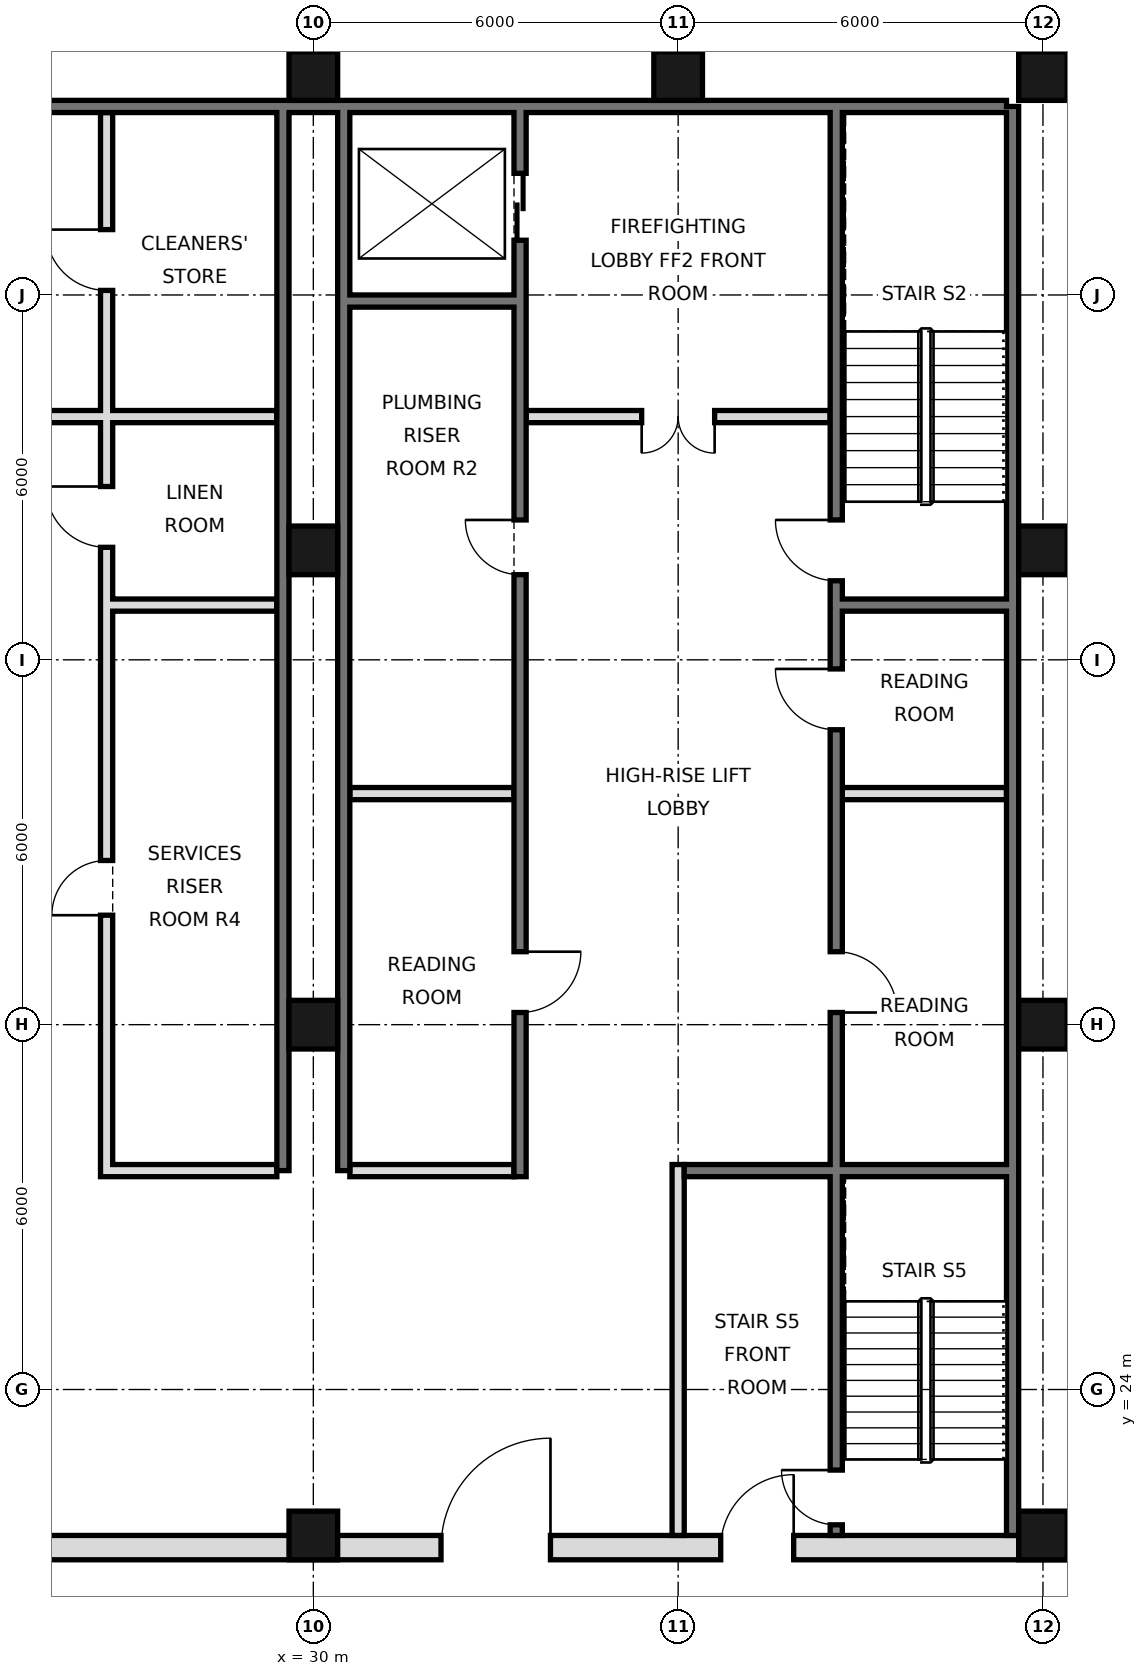
"""IFC4 building model, lengths in metres.
Left out: names, types, materials, properties, quantities, classifications, styles, units other than length and angle.
Written with IfcOpenShell. Run it as: python <this file> out.ifc"""

import sys

from ifc_helpers import new_model, si_unit, direction, frame, frame_2d, origin, origin_2d, place, context, subcontext, project, spatial, rectangle, hollow_rectangle, extrude, element, fill, save


model = new_model("IFC4")
c1 = context("Model", 3, precision=1e-05, world=origin(), true_north=direction((0.0, 1.0)))
c2 = subcontext(c1, "Body", "Model", "MODEL_VIEW")
j1 = project(units=[si_unit("LENGTHUNIT", "METRE"), si_unit("PLANEANGLEUNIT", "RADIAN")], contexts=[c1])
p1 = place(None, origin())
s1 = spatial("IfcSite", under=j1, at=p1, CompositionType="ELEMENT")
p2 = place(p1, origin())
s2 = spatial("IfcBuilding", under=s1, at=p2, CompositionType="ELEMENT")
p3 = place(p2, frame((0.0, 0.0, 75.0)))
s3 = spatial("IfcBuildingStorey", under=s2, at=p3, CompositionType="ELEMENT", Elevation=75.0)
for number, where, z_axis, x_axis in (
    (1, (30.0, 21.6, 0.0), (0.0, 0.0, 1.0), (1.0, 0.0, 0.0)),
    (2, (30.0, 30.0, 0.0), (0.0, 0.0, 1.0), (1.0, 0.0, 0.0)),
    (3, (30.0, 37.8, 0.0), (0.0, 0.0, 1.0), (1.0, 0.0, 0.0)),
    (4, (30.0, 45.6, 0.0), (0.0, 0.0, 1.0), (1.0, 0.0, 0.0)),
    (5, (36.0, 45.6, 0.0), (0.0, 0.0, 1.0), (1.0, 0.0, 0.0)),
    (6, (42.0, 21.6, 0.0), (0.0, 0.0, 1.0), (1.0, 0.0, 0.0)),
    (7, (42.0, 30.0, 0.0), (0.0, 0.0, 1.0), (1.0, 0.0, 0.0)),
    (8, (42.0, 37.8, 0.0), (0.0, 0.0, 1.0), (1.0, 0.0, 0.0)),
    (9, (42.0, 45.6, 0.0), (0.0, 0.0, 1.0), (1.0, 0.0, 0.0)),
):
    element("IfcColumn", number, at=place(p3, frame(where, z_axis=z_axis, x_axis=x_axis)), inside=s3, PredefinedType="COLUMN", context=c2, shape_type="SweptSolid", body=[
        extrude(hollow_rectangle(XDim=0.8, YDim=0.8, WallThickness=0.06, at=origin_2d()), origin(), (0.0, 0.0, 1.0), 3.6),
    ])
p4 = place(p3, frame((41.5, 21.6, 0.0), z_axis=(0.0, 0.0, 1.0), x_axis=(0.0, 1.0, 0.0)))
e10 = element("IfcWall", 10, at=p4, inside=s3, PredefinedType="SOLIDWALL", context=c2, shape_type="SweptSolid", body=[
    extrude(rectangle(XDim=23.5, YDim=0.2, at=frame_2d((11.75, 0.0))), origin(), (0.0, 0.0, 1.0), 3.42),
])
p5 = place(p3, frame((6.6, 45.1, 0.0), z_axis=(0.0, 0.0, 1.0), x_axis=(1.0, 0.0, 0.0)))
e11 = element("IfcWall", 11, at=p5, inside=s3, PredefinedType="SOLIDWALL", context=c2, shape_type="SweptSolid", body=[
    extrude(rectangle(XDim=34.8, YDim=0.2, at=frame_2d((17.4, 0.0))), origin(), (0.0, 0.0, 1.0), 3.42),
])
for number, where, z_axis, x_axis in (
    (12, (29.5, 27.6, 0.0), (0.0, 0.0, 1.0), (0.0, 1.0, 0.0)),
    (13, (30.5, 27.6, 0.0), (0.0, 0.0, 1.0), (0.0, 1.0, 0.0)),
):
    element("IfcWall", number, at=place(p3, frame(where, z_axis=z_axis, x_axis=x_axis)), inside=s3, PredefinedType="SOLIDWALL", context=c2, shape_type="SweptSolid", body=[
        extrude(rectangle(XDim=17.5, YDim=0.2, at=frame_2d((8.75, 0.0))), origin(), (0.0, 0.0, 1.0), 3.42),
    ])
p6 = place(p3, frame((5.6, 21.4, 0.0), z_axis=(0.0, 0.0, 1.0), x_axis=(1.0, 0.0, 0.0)))
e14 = element("IfcWall", 14, at=p6, inside=s3, PredefinedType="SOLIDWALL", context=c2, shape_type="SweptSolid", body=[
    extrude(rectangle(XDim=36.8, YDim=0.4, at=frame_2d((18.4, 0.0))), origin(), (0.0, 0.0, 1.0), 3.42),
])
p7 = place(p6, frame((8.5, 0.0, 0.0)))
e15 = element("IfcOpeningElement", 15, at=p7, cuts=e14, PredefinedType="OPENING", context=c2, shape_type="SweptSolid", body=[
    extrude(rectangle(XDim=1.8, YDim=2.1, at=frame_2d((0.9, 1.05))), frame((0.0, 0.21, 0.0), z_axis=(0.0, -1.0, 0.0), x_axis=(1.0, 0.0, 0.0)), (0.0, 0.0, 1.0), 0.42),
])
p8 = place(p6, frame((17.5, 0.0, 0.0)))
e16 = element("IfcOpeningElement", 16, at=p8, cuts=e14, PredefinedType="OPENING", context=c2, shape_type="SweptSolid", body=[
    extrude(rectangle(XDim=1.8, YDim=2.1, at=frame_2d((0.9, 1.05))), frame((0.0, 0.21, 0.0), z_axis=(0.0, -1.0, 0.0), x_axis=(1.0, 0.0, 0.0)), (0.0, 0.0, 1.0), 0.42),
])
p9 = place(p6, frame((26.5, 0.0, 0.0)))
e17 = element("IfcOpeningElement", 17, at=p9, cuts=e14, PredefinedType="OPENING", context=c2, shape_type="SweptSolid", body=[
    extrude(rectangle(XDim=1.8, YDim=2.1, at=frame_2d((0.9, 1.05))), frame((0.0, 0.21, 0.0), z_axis=(0.0, -1.0, 0.0), x_axis=(1.0, 0.0, 0.0)), (0.0, 0.0, 1.0), 0.42),
])
p10 = place(p6, frame((4.5, 0.0, 0.0)))
e18 = element("IfcOpeningElement", 18, at=p10, cuts=e14, PredefinedType="OPENING", context=c2, shape_type="SweptSolid", body=[
    extrude(rectangle(XDim=1.2, YDim=2.1, at=frame_2d((0.6, 1.05))), frame((0.0, 0.21, 0.0), z_axis=(0.0, -1.0, 0.0), x_axis=(1.0, 0.0, 0.0)), (0.0, 0.0, 1.0), 0.42),
])
p11 = place(p6, frame((31.1, 0.0, 0.0)))
e19 = element("IfcOpeningElement", 19, at=p11, cuts=e14, PredefinedType="OPENING", context=c2, shape_type="SweptSolid", body=[
    extrude(rectangle(XDim=1.2, YDim=2.1, at=frame_2d((0.6, 1.05))), frame((0.0, 0.21, 0.0), z_axis=(0.0, -1.0, 0.0), x_axis=(1.0, 0.0, 0.0)), (0.0, 0.0, 1.0), 0.42),
])
p12 = place(p3, frame((26.6, 27.5, 0.0), z_axis=(0.0, 0.0, 1.0), x_axis=(0.0, 1.0, 0.0)))
e20 = element("IfcWall", 20, at=p12, inside=s3, PredefinedType="SOLIDWALL", context=c2, shape_type="SweptSolid", body=[
    extrude(rectangle(XDim=17.5, YDim=0.2, at=frame_2d((8.75, 0.0))), origin(), (0.0, 0.0, 1.0), 3.42),
])
p13 = place(p12, frame((4.3, 0.0, 0.0)))
e21 = element("IfcOpeningElement", 21, at=p13, cuts=e20, PredefinedType="OPENING", context=c2, shape_type="SweptSolid", body=[
    extrude(rectangle(XDim=0.9, YDim=2.1, at=frame_2d((0.45, 1.05))), frame((0.0, 0.11, 0.0), z_axis=(0.0, -1.0, 0.0), x_axis=(1.0, 0.0, 0.0)), (0.0, 0.0, 1.0), 0.22),
])
p14 = place(p12, frame((10.35, 0.0, 0.0)))
e22 = element("IfcOpeningElement", 22, at=p14, cuts=e20, PredefinedType="OPENING", context=c2, shape_type="SweptSolid", body=[
    extrude(rectangle(XDim=1.0, YDim=2.1, at=frame_2d((0.5, 1.05))), frame((0.0, 0.11, 0.0), z_axis=(0.0, -1.0, 0.0), x_axis=(1.0, 0.0, 0.0)), (0.0, 0.0, 1.0), 0.22),
])
p15 = place(p12, frame((14.575, 0.0, 0.0)))
e23 = element("IfcOpeningElement", 23, at=p15, cuts=e20, PredefinedType="OPENING", context=c2, shape_type="SweptSolid", body=[
    extrude(rectangle(XDim=1.0, YDim=2.1, at=frame_2d((0.5, 1.05))), frame((0.0, 0.11, 0.0), z_axis=(0.0, -1.0, 0.0), x_axis=(1.0, 0.0, 0.0)), (0.0, 0.0, 1.0), 0.22),
])
p16 = place(p3, frame((33.4, 27.5, 0.0), z_axis=(0.0, 0.0, 1.0), x_axis=(0.0, 1.0, 0.0)))
e24 = element("IfcWall", 24, at=p16, inside=s3, PredefinedType="SOLIDWALL", context=c2, shape_type="SweptSolid", body=[
    extrude(rectangle(XDim=17.5, YDim=0.2, at=frame_2d((8.75, 0.0))), origin(), (0.0, 0.0, 1.0), 3.42),
])
p17 = place(p16, frame((15.4, 0.0, 0.0)))
e25 = element("IfcOpeningElement", 25, at=p17, cuts=e24, PredefinedType="OPENING", context=c2, shape_type="SweptSolid", body=[
    extrude(rectangle(XDim=1.1, YDim=2.1, at=frame_2d((0.55, 1.05))), frame((0.0, 0.11, 0.0), z_axis=(0.0, -1.0, 0.0), x_axis=(1.0, 0.0, 0.0)), (0.0, 0.0, 1.0), 0.22),
])
p18 = place(p16, frame((2.7, 0.0, 0.0)))
e26 = element("IfcOpeningElement", 26, at=p18, cuts=e24, PredefinedType="OPENING", context=c2, shape_type="SweptSolid", body=[
    extrude(rectangle(XDim=1.0, YDim=2.1, at=frame_2d((0.5, 1.05))), frame((0.0, 0.11, 0.0), z_axis=(0.0, -1.0, 0.0), x_axis=(1.0, 0.0, 0.0)), (0.0, 0.0, 1.0), 0.22),
])
p19 = place(p16, frame((9.9, 0.0, 0.0)))
e27 = element("IfcOpeningElement", 27, at=p19, cuts=e24, PredefinedType="OPENING", context=c2, shape_type="SweptSolid", body=[
    extrude(rectangle(XDim=0.9, YDim=2.1, at=frame_2d((0.45, 1.05))), frame((0.0, 0.11, 0.0), z_axis=(0.0, -1.0, 0.0), x_axis=(1.0, 0.0, 0.0)), (0.0, 0.0, 1.0), 0.22),
])
p20 = place(p3, frame((36.0, 21.6, 0.0), z_axis=(0.0, 0.0, 1.0), x_axis=(0.0, 1.0, 0.0)))
e28 = element("IfcWall", 28, at=p20, inside=s3, PredefinedType="PARTITIONING", context=c2, shape_type="SweptSolid", body=[
    extrude(rectangle(XDim=6.1, YDim=0.2, at=frame_2d((3.05, 0.0))), origin(), (0.0, 0.0, 1.0), 3.42),
])
p21 = place(p3, frame((38.6, 21.6, 0.0), z_axis=(0.0, 0.0, 1.0), x_axis=(0.0, 1.0, 0.0)))
e29 = element("IfcWall", 29, at=p21, inside=s3, PredefinedType="SOLIDWALL", context=c2, shape_type="SweptSolid", body=[
    extrude(rectangle(XDim=23.4, YDim=0.2, at=frame_2d((11.7, 0.0))), origin(), (0.0, 0.0, 1.0), 3.42),
])
p22 = place(p21, frame((8.6, 0.0, 0.0)))
e30 = element("IfcOpeningElement", 30, at=p22, cuts=e29, PredefinedType="OPENING", context=c2, shape_type="SweptSolid", body=[
    extrude(rectangle(XDim=1.0, YDim=2.1, at=frame_2d((0.5, 1.05))), frame((0.0, 0.11, 0.0), z_axis=(0.0, -1.0, 0.0), x_axis=(1.0, 0.0, 0.0)), (0.0, 0.0, 1.0), 0.22),
])
p23 = place(p21, frame((13.25, 0.0, 0.0)))
e31 = element("IfcOpeningElement", 31, at=p23, cuts=e29, PredefinedType="OPENING", context=c2, shape_type="SweptSolid", body=[
    extrude(rectangle(XDim=1.0, YDim=2.1, at=frame_2d((0.5, 1.05))), frame((0.0, 0.11, 0.0), z_axis=(0.0, -1.0, 0.0), x_axis=(1.0, 0.0, 0.0)), (0.0, 0.0, 1.0), 0.22),
])
p24 = place(p21, frame((15.7, 0.0, 0.0)))
e32 = element("IfcOpeningElement", 32, at=p24, cuts=e29, PredefinedType="OPENING", context=c2, shape_type="SweptSolid", body=[
    extrude(rectangle(XDim=1.0, YDim=2.1, at=frame_2d((0.5, 1.05))), frame((0.0, 0.11, 0.0), z_axis=(0.0, -1.0, 0.0), x_axis=(1.0, 0.0, 0.0)), (0.0, 0.0, 1.0), 0.22),
])
p25 = place(p21, frame((0.175, 0.0, 0.0)))
e33 = element("IfcOpeningElement", 33, at=p25, cuts=e29, PredefinedType="OPENING", context=c2, shape_type="SweptSolid", body=[
    extrude(rectangle(XDim=0.9, YDim=2.1, at=frame_2d((0.45, 1.05))), frame((0.0, 0.11, 0.0), z_axis=(0.0, -1.0, 0.0), x_axis=(1.0, 0.0, 0.0)), (0.0, 0.0, 1.0), 0.22),
])
p26 = place(p3, frame((26.7, 27.6, 0.0), z_axis=(0.0, 0.0, 1.0), x_axis=(1.0, 0.0, 0.0)))
e34 = element("IfcWall", 34, at=p26, inside=s3, PredefinedType="SOLIDWALL", context=c2, shape_type="SweptSolid", body=[
    extrude(rectangle(XDim=2.7, YDim=0.2, at=frame_2d((1.35, 0.0))), origin(), (0.0, 0.0, 1.0), 3.42),
])
p27 = place(p3, frame((30.6, 27.6, 0.0), z_axis=(0.0, 0.0, 1.0), x_axis=(1.0, 0.0, 0.0)))
e35 = element("IfcWall", 35, at=p27, inside=s3, PredefinedType="PARTITIONING", context=c2, shape_type="SweptSolid", body=[
    extrude(rectangle(XDim=2.7, YDim=0.2, at=frame_2d((1.35, 0.0))), origin(), (0.0, 0.0, 1.0), 3.42),
])
p28 = place(p3, frame((36.1, 27.6, 0.0), z_axis=(0.0, 0.0, 1.0), x_axis=(1.0, 0.0, 0.0)))
e36 = element("IfcWall", 36, at=p28, inside=s3, PredefinedType="SOLIDWALL", context=c2, shape_type="SweptSolid", body=[
    extrude(rectangle(XDim=5.3, YDim=0.2, at=frame_2d((2.65, 0.0))), origin(), (0.0, 0.0, 1.0), 3.42),
])
p29 = place(p3, frame((30.6, 33.8, 0.0), z_axis=(0.0, 0.0, 1.0), x_axis=(1.0, 0.0, 0.0)))
e37 = element("IfcWall", 37, at=p29, inside=s3, PredefinedType="SOLIDWALL", context=c2, shape_type="SweptSolid", body=[
    extrude(rectangle(XDim=2.7, YDim=0.2, at=frame_2d((1.35, 0.0))), origin(), (0.0, 0.0, 1.0), 3.42),
])
p30 = place(p3, frame((38.7, 33.8, 0.0), z_axis=(0.0, 0.0, 1.0), x_axis=(1.0, 0.0, 0.0)))
e38 = element("IfcWall", 38, at=p30, inside=s3, PredefinedType="PARTITIONING", context=c2, shape_type="SweptSolid", body=[
    extrude(rectangle(XDim=2.7, YDim=0.2, at=frame_2d((1.35, 0.0))), origin(), (0.0, 0.0, 1.0), 3.42),
])
for number, where, z_axis, x_axis in (
    (39, (26.7, 36.9, 0.0), (0.0, 0.0, 1.0), (1.0, 0.0, 0.0)),
    (40, (38.7, 36.9, 0.0), (0.0, 0.0, 1.0), (1.0, 0.0, 0.0)),
):
    element("IfcWall", number, at=place(p3, frame(where, z_axis=z_axis, x_axis=x_axis)), inside=s3, PredefinedType="SOLIDWALL", context=c2, shape_type="SweptSolid", body=[
        extrude(rectangle(XDim=2.7, YDim=0.2, at=frame_2d((1.35, 0.0))), origin(), (0.0, 0.0, 1.0), 3.42),
    ])
p31 = place(p3, frame((21.5, 40.0, 0.0), z_axis=(0.0, 0.0, 1.0), x_axis=(1.0, 0.0, 0.0)))
e41 = element("IfcWall", 41, at=p31, inside=s3, PredefinedType="PARTITIONING", context=c2, shape_type="SweptSolid", body=[
    extrude(rectangle(XDim=7.9, YDim=0.2, at=frame_2d((3.95, 0.0))), origin(), (0.0, 0.0, 1.0), 3.42),
])
p32 = place(p31, frame((1.9, 0.0, 0.0)))
e42 = element("IfcOpeningElement", 42, at=p32, cuts=e41, PredefinedType="OPENING", context=c2, shape_type="SweptSolid", body=[
    extrude(rectangle(XDim=1.2, YDim=2.1, at=frame_2d((0.6, 1.05))), frame((0.0, 0.11, 0.0), z_axis=(0.0, -1.0, 0.0), x_axis=(1.0, 0.0, 0.0)), (0.0, 0.0, 1.0), 0.22),
])
p33 = place(p3, frame((33.5, 40.0, 0.0), z_axis=(0.0, 0.0, 1.0), x_axis=(1.0, 0.0, 0.0)))
e43 = element("IfcWall", 43, at=p33, inside=s3, PredefinedType="PARTITIONING", context=c2, shape_type="SweptSolid", body=[
    extrude(rectangle(XDim=5.0, YDim=0.2, at=frame_2d((2.5, 0.0))), origin(), (0.0, 0.0, 1.0), 3.42),
])
p34 = place(p33, frame((1.9, 0.0, 0.0)))
e44 = element("IfcOpeningElement", 44, at=p34, cuts=e43, PredefinedType="OPENING", context=c2, shape_type="SweptSolid", body=[
    extrude(rectangle(XDim=1.2, YDim=2.1, at=frame_2d((0.6, 1.05))), frame((0.0, 0.11, 0.0), z_axis=(0.0, -1.0, 0.0), x_axis=(1.0, 0.0, 0.0)), (0.0, 0.0, 1.0), 0.22),
])
p35 = place(p3, frame((30.6, 41.9, 0.0), z_axis=(0.0, 0.0, 1.0), x_axis=(1.0, 0.0, 0.0)))
e45 = element("IfcWall", 45, at=p35, inside=s3, PredefinedType="SOLIDWALL", context=c2, shape_type="SweptSolid", body=[
    extrude(rectangle(XDim=2.7, YDim=0.2, at=frame_2d((1.35, 0.0))), origin(), (0.0, 0.0, 1.0), 3.42),
])
p36 = place(p9, frame((1.8, 0.0, 0.0), z_axis=(0.0, 0.0, 1.0), x_axis=(-1.0, 0.0, 0.0)))
e46 = element("IfcDoor", 46, at=p36, inside=s3, OperationType="SINGLE_SWING_LEFT", PredefinedType="DOOR", context=c2, shape_type="SweptSolid", body=[
    extrude(rectangle(XDim=1.8, YDim=2.1, at=frame_2d((0.9, 1.05))), frame((0.0, 0.025, 0.0), z_axis=(0.0, -1.0, 0.0), x_axis=(1.0, 0.0, 0.0)), (0.0, 0.0, 1.0), 0.05),
])
fill(e17, e46)
p37 = place(p11, frame((1.2, 0.0, 0.0), z_axis=(0.0, 0.0, 1.0), x_axis=(-1.0, 0.0, 0.0)))
e47 = element("IfcDoor", 47, at=p37, inside=s3, OperationType="SINGLE_SWING_LEFT", PredefinedType="DOOR", context=c2, shape_type="SweptSolid", body=[
    extrude(rectangle(XDim=1.2, YDim=2.1, at=frame_2d((0.6, 1.05))), frame((0.0, 0.025, 0.0), z_axis=(0.0, -1.0, 0.0), x_axis=(1.0, 0.0, 0.0)), (0.0, 0.0, 1.0), 0.05),
])
fill(e19, e47)
p38 = place(p34, frame((1.2, 0.0, 0.0), z_axis=(0.0, 0.0, 1.0), x_axis=(-1.0, 0.0, 0.0)))
e48 = element("IfcDoor", 48, at=p38, inside=s3, OperationType="DOUBLE_DOOR_SINGLE_SWING", PredefinedType="DOOR", context=c2, shape_type="SweptSolid", body=[
    extrude(rectangle(XDim=1.2, YDim=2.1, at=frame_2d((0.6, 1.05))), frame((0.0, 0.025, 0.0), z_axis=(0.0, -1.0, 0.0), x_axis=(1.0, 0.0, 0.0)), (0.0, 0.0, 1.0), 0.05),
])
fill(e44, e48)
p39 = place(p17, origin())
e49 = element("IfcDoor", 49, at=p39, inside=s3, OperationType="DOUBLE_DOOR_SLIDING", PredefinedType="DOOR", context=c2, shape_type="SweptSolid", body=[
    extrude(rectangle(XDim=1.1, YDim=2.1, at=frame_2d((0.55, 1.05))), frame((0.0, 0.025, 0.0), z_axis=(0.0, -1.0, 0.0), x_axis=(1.0, 0.0, 0.0)), (0.0, 0.0, 1.0), 0.05),
])
fill(e25, e49)
p40 = place(p22, frame((1.0, 0.0, 0.0), z_axis=(0.0, 0.0, 1.0), x_axis=(-1.0, 0.0, 0.0)))
e50 = element("IfcDoor", 50, at=p40, inside=s3, OperationType="SINGLE_SWING_RIGHT", PredefinedType="DOOR", context=c2, shape_type="SweptSolid", body=[
    extrude(rectangle(XDim=1.0, YDim=2.1, at=frame_2d((0.5, 1.05))), frame((0.0, 0.025, 0.0), z_axis=(0.0, -1.0, 0.0), x_axis=(1.0, 0.0, 0.0)), (0.0, 0.0, 1.0), 0.05),
])
fill(e30, e50)
p41 = place(p23, frame((1.0, 0.0, 0.0), z_axis=(0.0, 0.0, 1.0), x_axis=(-1.0, 0.0, 0.0)))
e51 = element("IfcDoor", 51, at=p41, inside=s3, OperationType="SINGLE_SWING_LEFT", PredefinedType="DOOR", context=c2, shape_type="SweptSolid", body=[
    extrude(rectangle(XDim=1.0, YDim=2.1, at=frame_2d((0.5, 1.05))), frame((0.0, 0.025, 0.0), z_axis=(0.0, -1.0, 0.0), x_axis=(1.0, 0.0, 0.0)), (0.0, 0.0, 1.0), 0.05),
])
fill(e31, e51)
p42 = place(p18, origin())
e52 = element("IfcDoor", 52, at=p42, inside=s3, OperationType="SINGLE_SWING_RIGHT", PredefinedType="DOOR", context=c2, shape_type="SweptSolid", body=[
    extrude(rectangle(XDim=1.0, YDim=2.1, at=frame_2d((0.5, 1.05))), frame((0.0, 0.025, 0.0), z_axis=(0.0, -1.0, 0.0), x_axis=(1.0, 0.0, 0.0)), (0.0, 0.0, 1.0), 0.05),
])
fill(e26, e52)
p43 = place(p24, frame((1.0, 0.0, 0.0), z_axis=(0.0, 0.0, 1.0), x_axis=(-1.0, 0.0, 0.0)))
e53 = element("IfcDoor", 53, at=p43, inside=s3, OperationType="SINGLE_SWING_LEFT", PredefinedType="DOOR", context=c2, shape_type="SweptSolid", body=[
    extrude(rectangle(XDim=1.0, YDim=2.1, at=frame_2d((0.5, 1.05))), frame((0.0, 0.025, 0.0), z_axis=(0.0, -1.0, 0.0), x_axis=(1.0, 0.0, 0.0)), (0.0, 0.0, 1.0), 0.05),
])
fill(e32, e53)
p44 = place(p25, frame((0.9, 0.0, 0.0), z_axis=(0.0, 0.0, 1.0), x_axis=(-1.0, 0.0, 0.0)))
e54 = element("IfcDoor", 54, at=p44, inside=s3, OperationType="SINGLE_SWING_LEFT", PredefinedType="DOOR", context=c2, shape_type="SweptSolid", body=[
    extrude(rectangle(XDim=0.9, YDim=2.1, at=frame_2d((0.45, 1.05))), frame((0.0, 0.025, 0.0), z_axis=(0.0, -1.0, 0.0), x_axis=(1.0, 0.0, 0.0)), (0.0, 0.0, 1.0), 0.05),
])
fill(e33, e54)
p45 = place(p19, frame((0.9, 0.0, 0.0), z_axis=(0.0, 0.0, 1.0), x_axis=(-1.0, 0.0, 0.0)))
e55 = element("IfcDoor", 55, at=p45, inside=s3, OperationType="SINGLE_SWING_LEFT", PredefinedType="DOOR", context=c2, shape_type="SweptSolid", body=[
    extrude(rectangle(XDim=0.9, YDim=2.1, at=frame_2d((0.45, 1.05))), frame((0.0, 0.025, 0.0), z_axis=(0.0, -1.0, 0.0), x_axis=(1.0, 0.0, 0.0)), (0.0, 0.0, 1.0), 0.05),
])
fill(e27, e55)
p46 = place(p13, origin())
e56 = element("IfcDoor", 56, at=p46, inside=s3, OperationType="SINGLE_SWING_LEFT", PredefinedType="DOOR", context=c2, shape_type="SweptSolid", body=[
    extrude(rectangle(XDim=0.9, YDim=2.1, at=frame_2d((0.45, 1.05))), frame((0.0, 0.025, 0.0), z_axis=(0.0, -1.0, 0.0), x_axis=(1.0, 0.0, 0.0)), (0.0, 0.0, 1.0), 0.05),
])
fill(e21, e56)
p47 = place(p14, frame((1.0, 0.0, 0.0), z_axis=(0.0, 0.0, 1.0), x_axis=(-1.0, 0.0, 0.0)))
e57 = element("IfcDoor", 57, at=p47, inside=s3, OperationType="SINGLE_SWING_LEFT", PredefinedType="DOOR", context=c2, shape_type="SweptSolid", body=[
    extrude(rectangle(XDim=1.0, YDim=2.1, at=frame_2d((0.5, 1.05))), frame((0.0, 0.025, 0.0), z_axis=(0.0, -1.0, 0.0), x_axis=(1.0, 0.0, 0.0)), (0.0, 0.0, 1.0), 0.05),
])
fill(e22, e57)
p48 = place(p15, frame((1.0, 0.0, 0.0), z_axis=(0.0, 0.0, 1.0), x_axis=(-1.0, 0.0, 0.0)))
e58 = element("IfcDoor", 58, at=p48, inside=s3, OperationType="SINGLE_SWING_LEFT", PredefinedType="DOOR", context=c2, shape_type="SweptSolid", body=[
    extrude(rectangle(XDim=1.0, YDim=2.1, at=frame_2d((0.5, 1.05))), frame((0.0, 0.025, 0.0), z_axis=(0.0, -1.0, 0.0), x_axis=(1.0, 0.0, 0.0)), (0.0, 0.0, 1.0), 0.05),
])
fill(e23, e58)
save(model, sys.argv[1])
